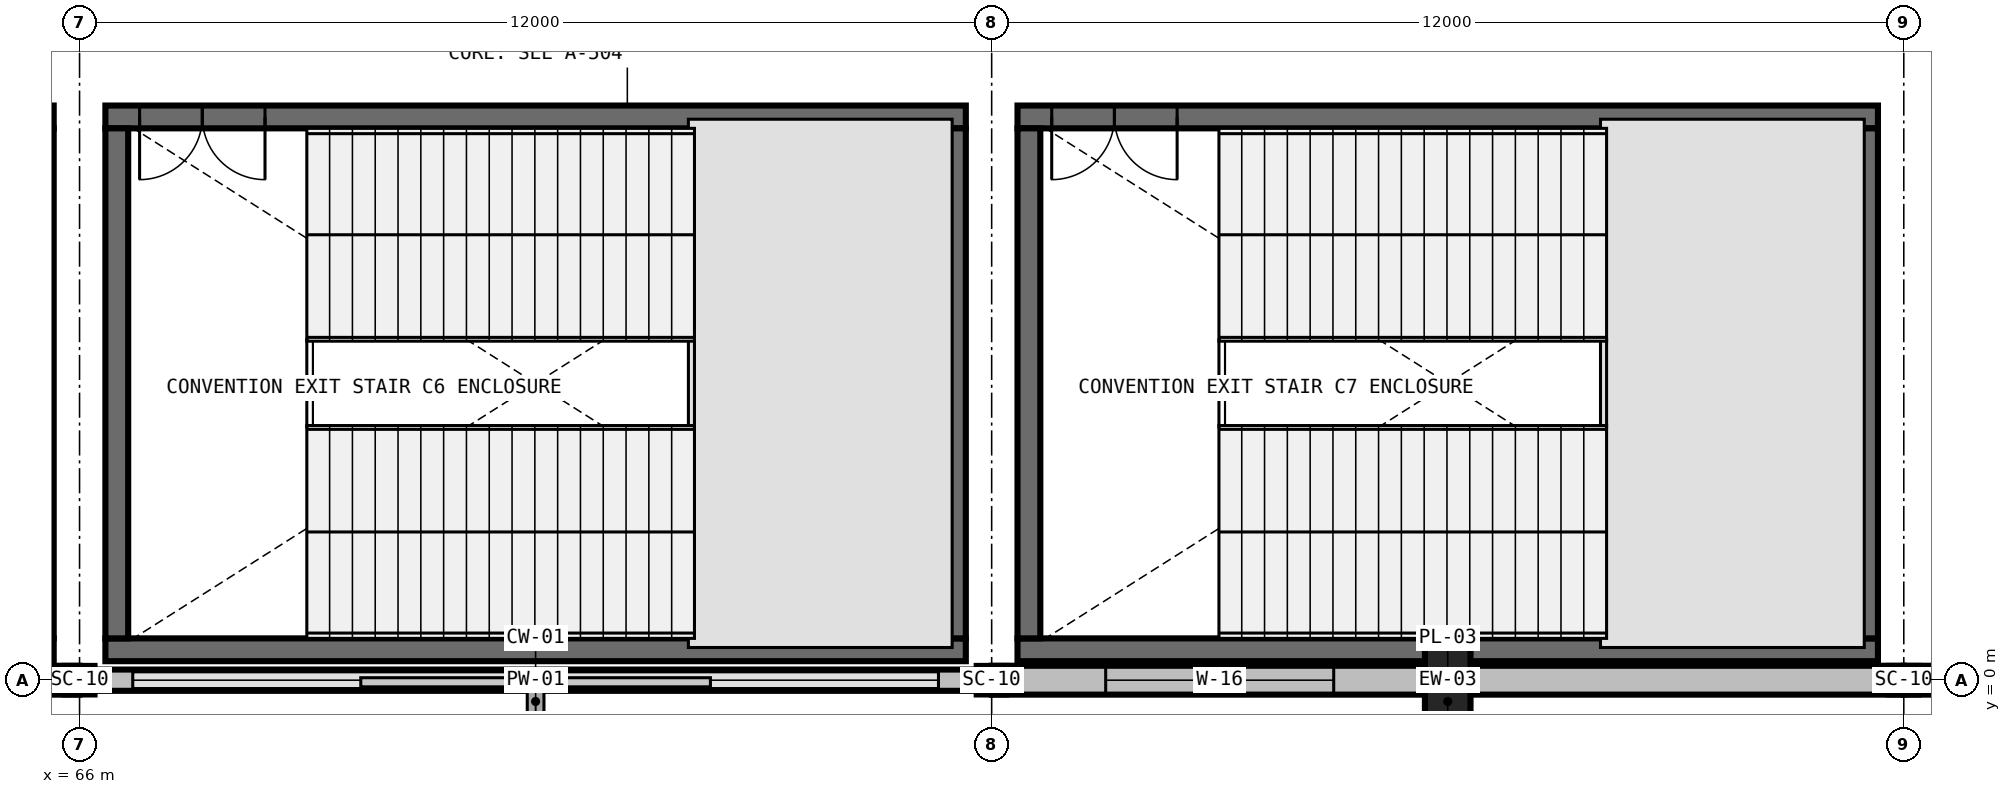
"""IFC4 building model, lengths in metres.
Left out: names, types, materials, properties, quantities, classifications, styles, units other than length and angle.
Written with IfcOpenShell. Run it as: python <this file> out.ifc"""

import sys

from ifc_helpers import new_model, si_unit, direction, frame, frame_2d, origin, origin_2d, place, context, subcontext, project, spatial, rectangle, i_section, extrude, element, fill, save


model = new_model("IFC4")
c1 = context("Model", 3, precision=1e-05, world=origin(), true_north=direction((0.0, 1.0)))
c2 = subcontext(c1, "Body", "Model", "MODEL_VIEW")
j1 = project(units=[si_unit("LENGTHUNIT", "METRE"), si_unit("PLANEANGLEUNIT", "RADIAN")], contexts=[c1])
p1 = place(None, origin())
s1 = spatial("IfcSite", under=j1, at=p1, CompositionType="ELEMENT")
p2 = place(p1, origin())
s2 = spatial("IfcBuilding", under=s1, at=p2, CompositionType="ELEMENT")
p3 = place(p2, frame((0.0, 0.0, 12.0)))
s3 = spatial("IfcBuildingStorey", under=s2, at=p3, CompositionType="ELEMENT", Elevation=12.0)
for number, where, z_axis, x_axis in (
    (1, (66.0, 0.0, 0.0), (0.0, 0.0, 1.0), (1.0, 0.0, 0.0)),
    (2, (78.0, 0.0, 0.0), (0.0, 0.0, 1.0), (1.0, 0.0, 0.0)),
    (3, (90.0, 0.0, 0.0), (0.0, 0.0, 1.0), (1.0, 0.0, 0.0)),
):
    element("IfcColumn", number, at=place(p3, frame(where, z_axis=z_axis, x_axis=x_axis)), inside=s3, PredefinedType="COLUMN", context=c2, shape_type="SweptSolid", body=[
        extrude(i_section(OverallWidth=0.394, OverallDepth=0.375, WebThickness=0.017, FlangeThickness=0.028, FilletRadius=0.031, at=origin_2d()), origin(), (0.0, 0.0, 1.0), 6.0),
    ])
p4 = place(p3, frame((84.0, 0.0, 0.0), z_axis=(0.0, 0.0, 1.0), x_axis=(1.0, 0.0, 0.0)))
e4 = element("IfcColumn", 4, at=p4, inside=s3, PredefinedType="PILASTER", context=c2, shape_type="SweptSolid", body=[
    extrude(rectangle(XDim=0.6, YDim=1.0, at=origin_2d()), origin(), (0.0, 0.0, 1.0), 6.0),
])
p5 = place(p3, frame((65.66, 0.4, 0.0), z_axis=(0.0, 0.0, 1.0), x_axis=(-1.0, 0.0, 0.0)))
e5 = element("IfcWall", 5, at=p5, inside=s3, PredefinedType="SHEAR", context=c2, shape_type="SweptSolid", body=[
    extrude(rectangle(XDim=11.32, YDim=0.3, at=frame_2d((5.66, 0.0))), origin(), (0.0, 0.0, 1.0), 6.0),
])
p6 = place(p3, frame((65.66, 7.41, 0.0), z_axis=(0.0, 0.0, 1.0), x_axis=(-1.0, 0.0, 0.0)))
e6 = element("IfcWall", 6, at=p6, inside=s3, PredefinedType="SHEAR", context=c2, shape_type="SweptSolid", body=[
    extrude(rectangle(XDim=11.32, YDim=0.3, at=frame_2d((5.66, 0.0))), origin(), (0.0, 0.0, 1.0), 6.0),
])
p7 = place(p6, frame((9.22, 0.0, 0.0)))
e7 = element("IfcOpeningElement", 7, at=p7, cuts=e6, PredefinedType="OPENING", context=c2, shape_type="SweptSolid", body=[
    extrude(rectangle(XDim=1.65, YDim=2.25, at=frame_2d((0.825, 1.125))), frame((0.0, 0.165, 0.0), z_axis=(0.0, -1.0, 0.0), x_axis=(1.0, 0.0, 0.0)), (0.0, 0.0, 1.0), 0.33),
])
p8 = place(p3, frame((65.51, 0.55, 0.0), z_axis=(0.0, 0.0, 1.0), x_axis=(0.0, 1.0, 0.0)))
e8 = element("IfcWall", 8, at=p8, inside=s3, PredefinedType="SHEAR", context=c2, shape_type="SweptSolid", body=[
    extrude(rectangle(XDim=6.71, YDim=0.3, at=frame_2d((3.355, 0.0))), origin(), (0.0, 0.0, 1.0), 6.0),
])
p9 = place(p3, frame((77.66, 0.4, 0.0), z_axis=(0.0, 0.0, 1.0), x_axis=(-1.0, 0.0, 0.0)))
e9 = element("IfcWall", 9, at=p9, inside=s3, PredefinedType="SHEAR", context=c2, shape_type="SweptSolid", body=[
    extrude(rectangle(XDim=11.32, YDim=0.3, at=frame_2d((5.66, 0.0))), origin(), (0.0, 0.0, 1.0), 6.0),
])
p10 = place(p3, frame((77.66, 7.41, 0.0), z_axis=(0.0, 0.0, 1.0), x_axis=(-1.0, 0.0, 0.0)))
e10 = element("IfcWall", 10, at=p10, inside=s3, PredefinedType="SHEAR", context=c2, shape_type="SweptSolid", body=[
    extrude(rectangle(XDim=11.32, YDim=0.3, at=frame_2d((5.66, 0.0))), origin(), (0.0, 0.0, 1.0), 6.0),
])
p11 = place(p10, frame((9.22, 0.0, 0.0)))
e11 = element("IfcOpeningElement", 11, at=p11, cuts=e10, PredefinedType="OPENING", context=c2, shape_type="SweptSolid", body=[
    extrude(rectangle(XDim=1.65, YDim=2.25, at=frame_2d((0.825, 1.125))), frame((0.0, 0.165, 0.0), z_axis=(0.0, -1.0, 0.0), x_axis=(1.0, 0.0, 0.0)), (0.0, 0.0, 1.0), 0.33),
])
for number, where, z_axis, x_axis in (
    (12, (66.49, 7.26, 0.0), (0.0, 0.0, 1.0), (0.0, -1.0, 0.0)),
    (13, (77.51, 0.55, 0.0), (0.0, 0.0, 1.0), (0.0, 1.0, 0.0)),
):
    element("IfcWall", number, at=place(p3, frame(where, z_axis=z_axis, x_axis=x_axis)), inside=s3, PredefinedType="SHEAR", context=c2, shape_type="SweptSolid", body=[
        extrude(rectangle(XDim=6.71, YDim=0.3, at=frame_2d((3.355, 0.0))), origin(), (0.0, 0.0, 1.0), 6.0),
    ])
p12 = place(p3, frame((89.66, 0.4, 0.0), z_axis=(0.0, 0.0, 1.0), x_axis=(-1.0, 0.0, 0.0)))
e14 = element("IfcWall", 14, at=p12, inside=s3, PredefinedType="SHEAR", context=c2, shape_type="SweptSolid", body=[
    extrude(rectangle(XDim=11.32, YDim=0.3, at=frame_2d((5.66, 0.0))), origin(), (0.0, 0.0, 1.0), 6.0),
])
p13 = place(p3, frame((89.66, 7.41, 0.0), z_axis=(0.0, 0.0, 1.0), x_axis=(-1.0, 0.0, 0.0)))
e15 = element("IfcWall", 15, at=p13, inside=s3, PredefinedType="SHEAR", context=c2, shape_type="SweptSolid", body=[
    extrude(rectangle(XDim=11.32, YDim=0.3, at=frame_2d((5.66, 0.0))), origin(), (0.0, 0.0, 1.0), 6.0),
])
p14 = place(p13, frame((9.22, 0.0, 0.0)))
e16 = element("IfcOpeningElement", 16, at=p14, cuts=e15, PredefinedType="OPENING", context=c2, shape_type="SweptSolid", body=[
    extrude(rectangle(XDim=1.65, YDim=2.25, at=frame_2d((0.825, 1.125))), frame((0.0, 0.165, 0.0), z_axis=(0.0, -1.0, 0.0), x_axis=(1.0, 0.0, 0.0)), (0.0, 0.0, 1.0), 0.33),
])
for number, where, z_axis, x_axis in (
    (17, (78.49, 7.26, 0.0), (0.0, 0.0, 1.0), (0.0, -1.0, 0.0)),
    (18, (89.51, 0.55, 0.0), (0.0, 0.0, 1.0), (0.0, 1.0, 0.0)),
):
    element("IfcWall", number, at=place(p3, frame(where, z_axis=z_axis, x_axis=x_axis)), inside=s3, PredefinedType="SHEAR", context=c2, shape_type="SweptSolid", body=[
        extrude(rectangle(XDim=6.71, YDim=0.3, at=frame_2d((3.355, 0.0))), origin(), (0.0, 0.0, 1.0), 6.0),
    ])
p15 = place(p3, frame((54.0, 0.0, 0.0), z_axis=(0.0, 0.0, 1.0), x_axis=(1.0, 0.0, 0.0)))
e19 = element("IfcWall", 19, at=p15, inside=s3, PredefinedType="STANDARD", context=c2, shape_type="SweptSolid", body=[
    extrude(rectangle(XDim=12.0, YDim=0.38, at=frame_2d((6.0, 0.0))), origin(), (0.0, 0.0, 1.0), 4.746),
])
p16 = place(p15, frame((1.5, 0.0, 0.85)))
e20 = element("IfcOpeningElement", 20, at=p16, cuts=e19, PredefinedType="OPENING", context=c2, shape_type="SweptSolid", body=[
    extrude(rectangle(XDim=2.2, YDim=1.95, at=frame_2d((1.1, 0.975))), frame((0.0, 0.205, 0.0), z_axis=(0.0, -1.0, 0.0), x_axis=(1.0, 0.0, 0.0)), (0.0, 0.0, 1.0), 0.41),
])
p17 = place(p3, frame((66.0, 0.0, 0.0), z_axis=(0.0, 0.0, 1.0), x_axis=(1.0, 0.0, 0.0)))
e21 = element("IfcWall", 21, at=p17, inside=s3, PredefinedType="PARAPET", context=c2, shape_type="SweptSolid", body=[
    extrude(rectangle(XDim=12.0, YDim=0.28, at=frame_2d((6.0, 0.0))), origin(), (0.0, 0.0, 1.0), 0.2),
])
p18 = place(p3, frame((78.0, 0.0, 0.0), z_axis=(0.0, 0.0, 1.0), x_axis=(1.0, 0.0, 0.0)))
e22 = element("IfcWall", 22, at=p18, inside=s3, PredefinedType="STANDARD", context=c2, shape_type="SweptSolid", body=[
    extrude(rectangle(XDim=12.0, YDim=0.38, at=frame_2d((6.0, 0.0))), origin(), (0.0, 0.0, 1.0), 4.746),
])
p19 = place(p18, frame((1.5, 0.0, 0.85)))
e23 = element("IfcOpeningElement", 23, at=p19, cuts=e22, PredefinedType="OPENING", context=c2, shape_type="SweptSolid", body=[
    extrude(rectangle(XDim=3.0, YDim=2.3, at=frame_2d((1.5, 1.15))), frame((0.0, 0.205, 0.0), z_axis=(0.0, -1.0, 0.0), x_axis=(1.0, 0.0, 0.0)), (0.0, 0.0, 1.0), 0.41),
])
p20 = place(p3, frame((90.0, 0.0, 0.0), z_axis=(0.0, 0.0, 1.0), x_axis=(1.0, 0.0, 0.0)))
e24 = element("IfcWall", 24, at=p20, inside=s3, PredefinedType="STANDARD", context=c2, shape_type="SweptSolid", body=[
    extrude(rectangle(XDim=6.0, YDim=0.38, at=frame_2d((3.0, 0.0))), origin(), (0.0, 0.0, 1.0), 4.746),
])
p21 = place(p11, origin())
e25 = element("IfcDoor", 25, at=p21, inside=s3, OperationType="DOUBLE_DOOR_SINGLE_SWING", PredefinedType="DOOR", context=c2, shape_type="SweptSolid", body=[
    extrude(rectangle(XDim=1.65, YDim=2.25, at=frame_2d((0.825, 1.125))), frame((0.0, 0.025, 0.0), z_axis=(0.0, -1.0, 0.0), x_axis=(1.0, 0.0, 0.0)), (0.0, 0.0, 1.0), 0.05),
])
fill(e11, e25)
p22 = place(p14, origin())
e26 = element("IfcDoor", 26, at=p22, inside=s3, OperationType="DOUBLE_DOOR_SINGLE_SWING", PredefinedType="DOOR", context=c2, shape_type="SweptSolid", body=[
    extrude(rectangle(XDim=1.65, YDim=2.25, at=frame_2d((0.825, 1.125))), frame((0.0, 0.025, 0.0), z_axis=(0.0, -1.0, 0.0), x_axis=(1.0, 0.0, 0.0)), (0.0, 0.0, 1.0), 0.05),
])
fill(e16, e26)
p23 = place(p19, origin())
e27 = element("IfcWindow", 27, at=p23, inside=s3, PartitioningType="TRIPLE_PANEL_VERTICAL", PredefinedType="WINDOW", context=c2, shape_type="SweptSolid", body=[
    extrude(rectangle(XDim=3.0, YDim=2.3, at=frame_2d((1.5, 1.15))), frame((0.0, 0.03, 0.0), z_axis=(0.0, -1.0, 0.0), x_axis=(1.0, 0.0, 0.0)), (0.0, 0.0, 1.0), 0.06),
])
fill(e23, e27)
save(model, sys.argv[1])
